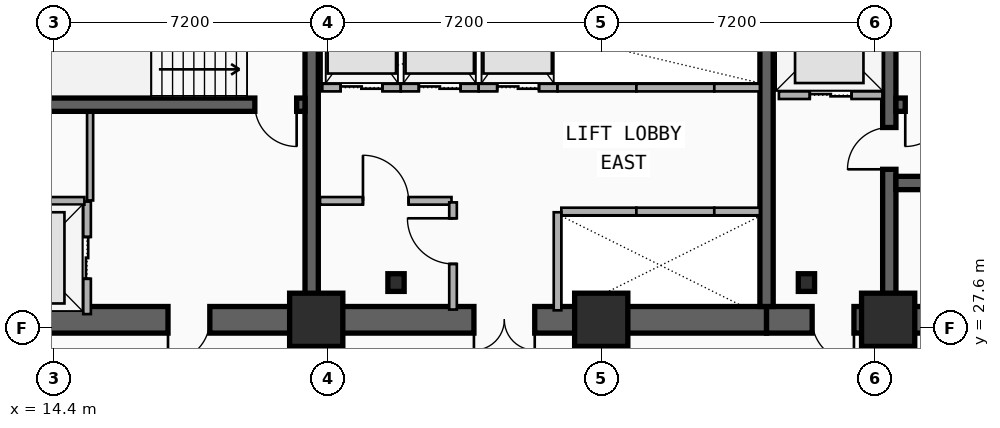
"""IFC4 building model, lengths in metres.
Left out: names, types, materials, properties, quantities, classifications, styles, units other than length and angle.
Written with IfcOpenShell. Run it as: python <this file> out.ifc"""

import sys

from ifc_helpers import new_model, si_unit, direction, frame, frame_2d, origin, origin_2d, place, context, subcontext, project, spatial, rectangle, i_section, extrude, element, fill, save


model = new_model("IFC4")
c1 = context("Model", 3, precision=1e-05, world=origin(), true_north=direction((0.0, 1.0)))
c2 = subcontext(c1, "Body", "Model", "MODEL_VIEW")
j1 = project(units=[si_unit("LENGTHUNIT", "METRE"), si_unit("PLANEANGLEUNIT", "RADIAN")], contexts=[c1])
p1 = place(None, origin())
s1 = spatial("IfcSite", under=j1, at=p1, CompositionType="ELEMENT")
p2 = place(p1, origin())
s2 = spatial("IfcBuilding", under=s1, at=p2, CompositionType="ELEMENT")
p3 = place(p2, frame((0.0, 0.0, 39.5)))
s3 = spatial("IfcBuildingStorey", under=s2, at=p3, CompositionType="ELEMENT", Elevation=39.5)
p4 = place(p3, frame((21.18, 27.82, 0.0), z_axis=(0.0, 0.0, 1.0), x_axis=(-1.0, 0.0, 0.0)))
e1 = element("IfcWall", 1, at=p4, inside=s3, PredefinedType="SHEAR", context=c2, shape_type="SweptSolid", body=[
    extrude(rectangle(XDim=9.03, YDim=0.7, at=frame_2d((4.515, 0.0))), origin(), (0.0, 0.0, 1.0), 3.5),
])
p5 = place(p4, frame((2.68, 0.0, 0.0)))
e2 = element("IfcOpeningElement", 2, at=p5, cuts=e1, PredefinedType="OPENING", context=c2, shape_type="SweptSolid", body=[
    extrude(rectangle(XDim=1.1, YDim=2.15, at=frame_2d((0.55, 1.075))), frame((0.0, 0.36, 0.0), z_axis=(0.0, -1.0, 0.0), x_axis=(1.0, 0.0, 0.0)), (0.0, 0.0, 1.0), 0.72),
])
p6 = place(p3, frame((33.15, 27.82, 0.0), z_axis=(0.0, 0.0, 1.0), x_axis=(-1.0, 0.0, 0.0)))
e3 = element("IfcWall", 3, at=p6, inside=s3, PredefinedType="SHEAR", context=c2, shape_type="SweptSolid", body=[
    extrude(rectangle(XDim=11.97, YDim=0.7, at=frame_2d((5.985, 0.0))), origin(), (0.0, 0.0, 1.0), 3.5),
])
p7 = place(p6, frame((6.1, 0.0, 0.0)))
e4 = element("IfcOpeningElement", 4, at=p7, cuts=e3, PredefinedType="OPENING", context=c2, shape_type="SweptSolid", body=[
    extrude(rectangle(XDim=1.6, YDim=2.2, at=frame_2d((0.8, 1.1))), frame((0.0, 0.36, 0.0), z_axis=(0.0, -1.0, 0.0), x_axis=(1.0, 0.0, 0.0)), (0.0, 0.0, 1.0), 0.72),
])
p8 = place(p3, frame((45.38, 27.82, 0.0), z_axis=(0.0, 0.0, 1.0), x_axis=(-1.0, 0.0, 0.0)))
e5 = element("IfcWall", 5, at=p8, inside=s3, PredefinedType="SHEAR", context=c2, shape_type="SweptSolid", body=[
    extrude(rectangle(XDim=12.23, YDim=0.7, at=frame_2d((6.115, 0.0))), origin(), (0.0, 0.0, 1.0), 3.5),
])
p9 = place(p8, frame((9.93, 0.0, 0.0)))
e6 = element("IfcOpeningElement", 6, at=p9, cuts=e5, PredefinedType="OPENING", context=c2, shape_type="SweptSolid", body=[
    extrude(rectangle(XDim=1.1, YDim=2.15, at=frame_2d((0.55, 1.075))), frame((0.0, 0.36, 0.0), z_axis=(0.0, -1.0, 0.0), x_axis=(1.0, 0.0, 0.0)), (0.0, 0.0, 1.0), 0.72),
])
p10 = place(p8, frame((6.23, 0.0, 0.0)))
e7 = element("IfcOpeningElement", 7, at=p10, cuts=e5, PredefinedType="OPENING", context=c2, shape_type="SweptSolid", body=[
    extrude(rectangle(XDim=1.1, YDim=2.15, at=frame_2d((0.55, 1.075))), frame((0.0, 0.36, 0.0), z_axis=(0.0, -1.0, 0.0), x_axis=(1.0, 0.0, 0.0)), (0.0, 0.0, 1.0), 0.72),
])
for number, where, z_axis, x_axis in (
    (8, (21.18, 28.17, 0.0), (0.0, 0.0, 1.0), (0.0, 1.0, 0.0)),
    (9, (33.15, 28.17, 0.0), (0.0, 0.0, 1.0), (0.0, 1.0, 0.0)),
):
    element("IfcWall", number, at=place(p3, frame(where, z_axis=z_axis, x_axis=x_axis)), inside=s3, PredefinedType="SHEAR", context=c2, shape_type="SweptSolid", body=[
        extrude(rectangle(XDim=8.53, YDim=0.35, at=frame_2d((4.265, 0.0))), origin(), (0.0, 0.0, 1.0), 3.5),
    ])
p11 = place(p3, frame((36.38, 28.17, 0.0), z_axis=(0.0, 0.0, 1.0), x_axis=(0.0, 1.0, 0.0)))
e10 = element("IfcWall", 10, at=p11, inside=s3, PredefinedType="SHEAR", context=c2, shape_type="SweptSolid", body=[
    extrude(rectangle(XDim=8.53, YDim=0.35, at=frame_2d((4.265, 0.0))), origin(), (0.0, 0.0, 1.0), 3.5),
])
p12 = place(p11, frame((3.61, 0.0, 0.0)))
e11 = element("IfcOpeningElement", 11, at=p12, cuts=e10, PredefinedType="OPENING", context=c2, shape_type="SweptSolid", body=[
    extrude(rectangle(XDim=1.1, YDim=2.15, at=frame_2d((0.55, 1.075))), frame((0.0, 0.185, 0.0), z_axis=(0.0, -1.0, 0.0), x_axis=(1.0, 0.0, 0.0)), (0.0, 0.0, 1.0), 0.37),
])
p13 = place(p3, frame((21.005, 33.48, 0.0), z_axis=(0.0, 0.0, 1.0), x_axis=(-1.0, 0.0, 0.0)))
e12 = element("IfcWall", 12, at=p13, inside=s3, PredefinedType="SHEAR", context=c2, shape_type="SweptSolid", body=[
    extrude(rectangle(XDim=8.505, YDim=0.35, at=frame_2d((4.252, 0.0))), origin(), (0.0, 0.0, 1.0), 3.5),
])
p14 = place(p13, frame((0.22, 0.0, 0.0)))
e13 = element("IfcOpeningElement", 13, at=p14, cuts=e12, PredefinedType="OPENING", context=c2, shape_type="SweptSolid", body=[
    extrude(rectangle(XDim=1.1, YDim=2.15, at=frame_2d((0.55, 1.075))), frame((0.0, 0.185, 0.0), z_axis=(0.0, -1.0, 0.0), x_axis=(1.0, 0.0, 0.0)), (0.0, 0.0, 1.0), 0.37),
])
p15 = place(p3, frame((45.03, 33.48, 0.0), z_axis=(0.0, 0.0, 1.0), x_axis=(-1.0, 0.0, 0.0)))
e14 = element("IfcWall", 14, at=p15, inside=s3, PredefinedType="SHEAR", context=c2, shape_type="SweptSolid", body=[
    extrude(rectangle(XDim=8.475, YDim=0.35, at=frame_2d((4.238, 0.0))), origin(), (0.0, 0.0, 1.0), 3.5),
])
p16 = place(p15, frame((7.13, 0.0, 0.0)))
e15 = element("IfcOpeningElement", 15, at=p16, cuts=e14, PredefinedType="OPENING", context=c2, shape_type="SweptSolid", body=[
    extrude(rectangle(XDim=1.1, YDim=2.15, at=frame_2d((0.55, 1.075))), frame((0.0, 0.185, 0.0), z_axis=(0.0, -1.0, 0.0), x_axis=(1.0, 0.0, 0.0)), (0.0, 0.0, 1.0), 0.37),
])
p17 = place(p3, frame((36.555, 31.42, 0.0), z_axis=(0.0, 0.0, 1.0), x_axis=(1.0, 0.0, 0.0)))
e16 = element("IfcWall", 16, at=p17, inside=s3, PredefinedType="SHEAR", context=c2, shape_type="SweptSolid", body=[
    extrude(rectangle(XDim=8.475, YDim=0.35, at=frame_2d((4.238, 0.0))), origin(), (0.0, 0.0, 1.0), 3.5),
])
for number, where, z_axis, x_axis in (
    (17, (23.4, 28.8, 0.0), (0.0, 0.0, 1.0), (1.0, 0.0, 0.0)),
    (18, (34.2, 28.8, 0.0), (0.0, 0.0, 1.0), (1.0, 0.0, 0.0)),
):
    element("IfcColumn", number, at=place(p3, frame(where, z_axis=z_axis, x_axis=x_axis)), inside=s3, PredefinedType="COLUMN", context=c2, shape_type="SweptSolid", body=[
        extrude(i_section(OverallWidth=0.428, OverallDepth=0.465, WebThickness=0.045, FlangeThickness=0.073, FilletRadius=0.015, at=origin_2d()), origin(), (0.0, 0.0, 1.0), 3.5),
    ])
for number, where, z_axis, x_axis in (
    (19, (21.3, 27.82, 0.0), (0.0, 0.0, 1.0), (1.0, 0.0, 0.0)),
    (20, (28.8, 27.82, 0.0), (0.0, 0.0, 1.0), (1.0, 0.0, 0.0)),
    (21, (36.35, 27.82, 0.0), (0.0, 0.0, 1.0), (1.0, 0.0, 0.0)),
):
    element("IfcColumn", number, at=place(p3, frame(where, z_axis=z_axis, x_axis=x_axis)), inside=s3, PredefinedType="COLUMN", context=c2, shape_type="SweptSolid", body=[
        extrude(rectangle(XDim=1.4, YDim=1.4, at=origin_2d()), origin(), (0.0, 0.0, 1.0), 3.5),
    ])
p18 = place(p3, frame((15.27, 27.97, 0.0), z_axis=(0.0, 0.0, 1.0), x_axis=(0.0, 1.0, 0.0)))
e22 = element("IfcWall", 22, at=p18, inside=s3, PredefinedType="PARTITIONING", context=c2, shape_type="SweptSolid", body=[
    extrude(rectangle(XDim=2.96, YDim=0.2, at=frame_2d((1.48, 0.0))), origin(), (0.0, 0.0, 1.0), 2.212),
])
p19 = place(p18, frame((0.93, 0.0, 0.0)))
e23 = element("IfcOpeningElement", 23, at=p19, cuts=e22, PredefinedType="OPENING", context=c2, shape_type="SweptSolid", body=[
    extrude(rectangle(XDim=1.1, YDim=2.15, at=frame_2d((0.55, 1.075))), frame((0.0, 0.11, 0.0), z_axis=(0.0, -1.0, 0.0), x_axis=(1.0, 0.0, 0.0)), (0.0, 0.0, 1.0), 0.22),
])
p20 = place(p3, frame((12.45, 30.95, 0.0), z_axis=(0.0, 0.0, 1.0), x_axis=(1.0, 0.0, 0.0)))
e24 = element("IfcWall", 24, at=p20, inside=s3, PredefinedType="PARTITIONING", context=c2, shape_type="SweptSolid", body=[
    extrude(rectangle(XDim=2.75, YDim=0.2, at=frame_2d((1.375, 0.0))), origin(), (0.0, 0.0, 1.0), 2.212),
])
p21 = place(p3, frame((33.475, 33.73, 0.0), z_axis=(0.0, 0.0, 1.0), x_axis=(1.0, 0.0, 0.0)))
e25 = element("IfcWall", 25, at=p21, inside=s3, PredefinedType="PARTITIONING", context=c2, shape_type="SweptSolid", body=[
    extrude(rectangle(XDim=2.725, YDim=0.2, at=frame_2d((1.362, 0.0))), origin(), (0.0, 0.0, 1.0), 2.212),
])
p22 = place(p21, frame((0.812, 0.0, 0.0)))
e26 = element("IfcOpeningElement", 26, at=p22, cuts=e25, PredefinedType="OPENING", context=c2, shape_type="SweptSolid", body=[
    extrude(rectangle(XDim=1.1, YDim=2.15, at=frame_2d((0.55, 1.075))), frame((0.0, 0.11, 0.0), z_axis=(0.0, -1.0, 0.0), x_axis=(1.0, 0.0, 0.0)), (0.0, 0.0, 1.0), 0.22),
])
p23 = place(p3, frame((27.75, 30.67, 0.0), z_axis=(0.0, 0.0, 1.0), x_axis=(1.0, 0.0, 0.0)))
e27 = element("IfcWall", 27, at=p23, inside=s3, PredefinedType="PARTITIONING", context=c2, shape_type="SweptSolid", body=[
    extrude(rectangle(XDim=1.975, YDim=0.2, at=frame_2d((0.988, 0.0))), origin(), (0.0, 0.0, 1.0), 2.212),
])
p24 = place(p3, frame((27.65, 28.07, 0.0), z_axis=(0.0, 0.0, 1.0), x_axis=(0.0, 1.0, 0.0)))
e28 = element("IfcWall", 28, at=p24, inside=s3, PredefinedType="PARTITIONING", context=c2, shape_type="SweptSolid", body=[
    extrude(rectangle(XDim=2.58, YDim=0.2, at=frame_2d((1.29, 0.0))), origin(), (0.0, 0.0, 1.0), 2.212),
])
p25 = place(p3, frame((29.725, 30.67, 0.0), z_axis=(0.0, 0.0, 1.0), x_axis=(1.0, 0.0, 0.0)))
e29 = element("IfcWall", 29, at=p25, inside=s3, PredefinedType="PARTITIONING", context=c2, shape_type="SweptSolid", body=[
    extrude(rectangle(XDim=2.05, YDim=0.2, at=frame_2d((1.025, 0.0))), origin(), (0.0, 0.0, 1.0), 2.62),
])
p26 = place(p3, frame((31.775, 30.67, 0.0), z_axis=(0.0, 0.0, 1.0), x_axis=(1.0, 0.0, 0.0)))
e30 = element("IfcWall", 30, at=p26, inside=s3, PredefinedType="PARTITIONING", context=c2, shape_type="SweptSolid", body=[
    extrude(rectangle(XDim=1.2, YDim=0.2, at=frame_2d((0.6, 0.0))), origin(), (0.0, 0.0, 1.0), 2.62),
])
p27 = place(p3, frame((21.46, 33.93, 0.0), z_axis=(0.0, 0.0, 1.0), x_axis=(1.0, 0.0, 0.0)))
e31 = element("IfcWall", 31, at=p27, inside=s3, PredefinedType="PARTITIONING", context=c2, shape_type="SweptSolid", body=[
    extrude(rectangle(XDim=2.065, YDim=0.2, at=frame_2d((1.032, 0.0))), origin(), (0.0, 0.0, 1.0), 2.212),
])
p28 = place(p27, frame((0.482, 0.0, 0.0)))
e32 = element("IfcOpeningElement", 32, at=p28, cuts=e31, PredefinedType="OPENING", context=c2, shape_type="SweptSolid", body=[
    extrude(rectangle(XDim=1.1, YDim=2.15, at=frame_2d((0.55, 1.075))), frame((0.0, 0.11, 0.0), z_axis=(0.0, -1.0, 0.0), x_axis=(1.0, 0.0, 0.0)), (0.0, 0.0, 1.0), 0.22),
])
p29 = place(p3, frame((23.525, 33.93, 0.0), z_axis=(0.0, 0.0, 1.0), x_axis=(1.0, 0.0, 0.0)))
e33 = element("IfcWall", 33, at=p29, inside=s3, PredefinedType="PARTITIONING", context=c2, shape_type="SweptSolid", body=[
    extrude(rectangle(XDim=2.05, YDim=0.2, at=frame_2d((1.025, 0.0))), origin(), (0.0, 0.0, 1.0), 3.24),
])
p30 = place(p29, frame((0.475, 0.0, 0.0)))
e34 = element("IfcOpeningElement", 34, at=p30, cuts=e33, PredefinedType="OPENING", context=c2, shape_type="SweptSolid", body=[
    extrude(rectangle(XDim=1.1, YDim=2.15, at=frame_2d((0.55, 1.075))), frame((0.0, 0.11, 0.0), z_axis=(0.0, -1.0, 0.0), x_axis=(1.0, 0.0, 0.0)), (0.0, 0.0, 1.0), 0.22),
])
p31 = place(p3, frame((25.575, 33.93, 0.0), z_axis=(0.0, 0.0, 1.0), x_axis=(1.0, 0.0, 0.0)))
e35 = element("IfcWall", 35, at=p31, inside=s3, PredefinedType="PARTITIONING", context=c2, shape_type="SweptSolid", body=[
    extrude(rectangle(XDim=2.075, YDim=0.2, at=frame_2d((1.038, 0.0))), origin(), (0.0, 0.0, 1.0), 3.24),
])
p32 = place(p31, frame((0.488, 0.0, 0.0)))
e36 = element("IfcOpeningElement", 36, at=p32, cuts=e35, PredefinedType="OPENING", context=c2, shape_type="SweptSolid", body=[
    extrude(rectangle(XDim=1.1, YDim=2.15, at=frame_2d((0.55, 1.075))), frame((0.0, 0.11, 0.0), z_axis=(0.0, -1.0, 0.0), x_axis=(1.0, 0.0, 0.0)), (0.0, 0.0, 1.0), 0.22),
])
p33 = place(p3, frame((27.65, 33.93, 0.0), z_axis=(0.0, 0.0, 1.0), x_axis=(1.0, 0.0, 0.0)))
e37 = element("IfcWall", 37, at=p33, inside=s3, PredefinedType="PARTITIONING", context=c2, shape_type="SweptSolid", body=[
    extrude(rectangle(XDim=2.075, YDim=0.2, at=frame_2d((1.038, 0.0))), origin(), (0.0, 0.0, 1.0), 2.212),
])
p34 = place(p3, frame((29.725, 33.93, 0.0), z_axis=(0.0, 0.0, 1.0), x_axis=(1.0, 0.0, 0.0)))
e38 = element("IfcWall", 38, at=p34, inside=s3, PredefinedType="PARTITIONING", context=c2, shape_type="SweptSolid", body=[
    extrude(rectangle(XDim=2.05, YDim=0.2, at=frame_2d((1.025, 0.0))), origin(), (0.0, 0.0, 1.0), 3.24),
])
p35 = place(p3, frame((31.775, 33.93, 0.0), z_axis=(0.0, 0.0, 1.0), x_axis=(1.0, 0.0, 0.0)))
e39 = element("IfcWall", 39, at=p35, inside=s3, PredefinedType="PARTITIONING", context=c2, shape_type="SweptSolid", body=[
    extrude(rectangle(XDim=1.2, YDim=0.2, at=frame_2d((0.6, 0.0))), origin(), (0.0, 0.0, 1.0), 3.24),
])
p36 = place(p3, frame((21.4, 30.95, 0.0), z_axis=(0.0, 0.0, 1.0), x_axis=(1.0, 0.0, 0.0)))
e40 = element("IfcWall", 40, at=p36, inside=s3, PredefinedType="PARTITIONING", context=c2, shape_type="SweptSolid", body=[
    extrude(rectangle(XDim=3.46, YDim=0.2, at=frame_2d((1.73, 0.0))), origin(), (0.0, 0.0, 1.0), 2.28),
])
p37 = place(p36, frame((1.13, 0.0, 0.0)))
e41 = element("IfcOpeningElement", 41, at=p37, cuts=e40, PredefinedType="OPENING", context=c2, shape_type="SweptSolid", body=[
    extrude(rectangle(XDim=1.2, YDim=2.15, at=frame_2d((0.6, 1.075))), frame((0.0, 0.11, 0.0), z_axis=(0.0, -1.0, 0.0), x_axis=(1.0, 0.0, 0.0)), (0.0, 0.0, 1.0), 0.22),
])
p38 = place(p3, frame((24.9, 28.09, 0.0), z_axis=(0.0, 0.0, 1.0), x_axis=(0.0, 1.0, 0.0)))
e42 = element("IfcWall", 42, at=p38, inside=s3, PredefinedType="PARTITIONING", context=c2, shape_type="SweptSolid", body=[
    extrude(rectangle(XDim=2.82, YDim=0.2, at=frame_2d((1.41, 0.0))), origin(), (0.0, 0.0, 1.0), 2.62),
])
p39 = place(p38, frame((1.201, 0.0, 0.0)))
e43 = element("IfcOpeningElement", 43, at=p39, cuts=e42, PredefinedType="OPENING", context=c2, shape_type="SweptSolid", body=[
    extrude(rectangle(XDim=1.2, YDim=2.15, at=frame_2d((0.6, 1.075))), frame((0.0, 0.11, 0.0), z_axis=(0.0, -1.0, 0.0), x_axis=(1.0, 0.0, 0.0)), (0.0, 0.0, 1.0), 0.22),
])
p40 = place(p3, frame((15.35, 30.96, 0.0), z_axis=(0.0, 0.0, 1.0), x_axis=(0.0, 1.0, 0.0)))
e44 = element("IfcWall", 44, at=p40, inside=s3, PredefinedType="PARTITIONING", context=c2, shape_type="SweptSolid", body=[
    extrude(rectangle(XDim=2.31, YDim=0.16, at=frame_2d((1.155, 0.0))), origin(), (0.0, 0.0, 1.0), 3.24),
])
p41 = place(p19, origin())
e45 = element("IfcDoor", 45, at=p41, inside=s3, OperationType="DOUBLE_DOOR_SLIDING", PredefinedType="DOOR", context=c2, shape_type="SweptSolid", body=[
    extrude(rectangle(XDim=1.1, YDim=2.15, at=frame_2d((0.55, 1.075))), frame((0.0, 0.025, 0.0), z_axis=(0.0, -1.0, 0.0), x_axis=(1.0, 0.0, 0.0)), (0.0, 0.0, 1.0), 0.05),
])
fill(e23, e45)
p42 = place(p22, origin())
e46 = element("IfcDoor", 46, at=p42, inside=s3, OperationType="DOUBLE_DOOR_SLIDING", PredefinedType="DOOR", context=c2, shape_type="SweptSolid", body=[
    extrude(rectangle(XDim=1.1, YDim=2.15, at=frame_2d((0.55, 1.075))), frame((0.0, 0.025, 0.0), z_axis=(0.0, -1.0, 0.0), x_axis=(1.0, 0.0, 0.0)), (0.0, 0.0, 1.0), 0.05),
])
fill(e26, e46)
p43 = place(p28, origin())
e47 = element("IfcDoor", 47, at=p43, inside=s3, OperationType="DOUBLE_DOOR_SLIDING", PredefinedType="DOOR", context=c2, shape_type="SweptSolid", body=[
    extrude(rectangle(XDim=1.1, YDim=2.15, at=frame_2d((0.55, 1.075))), frame((0.0, 0.025, 0.0), z_axis=(0.0, -1.0, 0.0), x_axis=(1.0, 0.0, 0.0)), (0.0, 0.0, 1.0), 0.05),
])
fill(e32, e47)
p44 = place(p30, origin())
e48 = element("IfcDoor", 48, at=p44, inside=s3, OperationType="DOUBLE_DOOR_SLIDING", PredefinedType="DOOR", context=c2, shape_type="SweptSolid", body=[
    extrude(rectangle(XDim=1.1, YDim=2.15, at=frame_2d((0.55, 1.075))), frame((0.0, 0.025, 0.0), z_axis=(0.0, -1.0, 0.0), x_axis=(1.0, 0.0, 0.0)), (0.0, 0.0, 1.0), 0.05),
])
fill(e34, e48)
p45 = place(p32, origin())
e49 = element("IfcDoor", 49, at=p45, inside=s3, OperationType="DOUBLE_DOOR_SLIDING", PredefinedType="DOOR", context=c2, shape_type="SweptSolid", body=[
    extrude(rectangle(XDim=1.1, YDim=2.15, at=frame_2d((0.55, 1.075))), frame((0.0, 0.025, 0.0), z_axis=(0.0, -1.0, 0.0), x_axis=(1.0, 0.0, 0.0)), (0.0, 0.0, 1.0), 0.05),
])
fill(e36, e49)
p46 = place(p14, origin())
e50 = element("IfcDoor", 50, at=p46, inside=s3, OperationType="SINGLE_SWING_LEFT", PredefinedType="DOOR", context=c2, shape_type="SweptSolid", body=[
    extrude(rectangle(XDim=1.1, YDim=2.15, at=frame_2d((0.55, 1.075))), frame((0.0, 0.025, 0.0), z_axis=(0.0, -1.0, 0.0), x_axis=(1.0, 0.0, 0.0)), (0.0, 0.0, 1.0), 0.05),
])
fill(e13, e50)
p47 = place(p5, origin())
e51 = element("IfcDoor", 51, at=p47, inside=s3, OperationType="SINGLE_SWING_RIGHT", PredefinedType="DOOR", context=c2, shape_type="SweptSolid", body=[
    extrude(rectangle(XDim=1.1, YDim=2.15, at=frame_2d((0.55, 1.075))), frame((0.0, 0.025, 0.0), z_axis=(0.0, -1.0, 0.0), x_axis=(1.0, 0.0, 0.0)), (0.0, 0.0, 1.0), 0.05),
])
fill(e2, e51)
p48 = place(p16, origin())
e52 = element("IfcDoor", 52, at=p48, inside=s3, OperationType="SINGLE_SWING_RIGHT", PredefinedType="DOOR", context=c2, shape_type="SweptSolid", body=[
    extrude(rectangle(XDim=1.1, YDim=2.15, at=frame_2d((0.55, 1.075))), frame((0.0, 0.025, 0.0), z_axis=(0.0, -1.0, 0.0), x_axis=(1.0, 0.0, 0.0)), (0.0, 0.0, 1.0), 0.05),
])
fill(e15, e52)
p49 = place(p12, origin())
e53 = element("IfcDoor", 53, at=p49, inside=s3, OperationType="SINGLE_SWING_LEFT", PredefinedType="DOOR", context=c2, shape_type="SweptSolid", body=[
    extrude(rectangle(XDim=1.1, YDim=2.15, at=frame_2d((0.55, 1.075))), frame((0.0, 0.025, 0.0), z_axis=(0.0, -1.0, 0.0), x_axis=(1.0, 0.0, 0.0)), (0.0, 0.0, 1.0), 0.05),
])
fill(e11, e53)
p50 = place(p9, origin())
e54 = element("IfcDoor", 54, at=p50, inside=s3, OperationType="SINGLE_SWING_LEFT", PredefinedType="DOOR", context=c2, shape_type="SweptSolid", body=[
    extrude(rectangle(XDim=1.1, YDim=2.15, at=frame_2d((0.55, 1.075))), frame((0.0, 0.025, 0.0), z_axis=(0.0, -1.0, 0.0), x_axis=(1.0, 0.0, 0.0)), (0.0, 0.0, 1.0), 0.05),
])
fill(e6, e54)
p51 = place(p7, origin())
e55 = element("IfcDoor", 55, at=p51, inside=s3, OperationType="SINGLE_SWING_LEFT", PredefinedType="DOOR", context=c2, shape_type="SweptSolid", body=[
    extrude(rectangle(XDim=1.6, YDim=2.2, at=frame_2d((0.8, 1.1))), frame((0.0, 0.025, 0.0), z_axis=(0.0, -1.0, 0.0), x_axis=(1.0, 0.0, 0.0)), (0.0, 0.0, 1.0), 0.05),
])
fill(e4, e55)
p52 = place(p37, origin())
e56 = element("IfcDoor", 56, at=p52, inside=s3, OperationType="SINGLE_SWING_LEFT", PredefinedType="DOOR", context=c2, shape_type="SweptSolid", body=[
    extrude(rectangle(XDim=1.2, YDim=2.15, at=frame_2d((0.6, 1.075))), frame((0.0, 0.025, 0.0), z_axis=(0.0, -1.0, 0.0), x_axis=(1.0, 0.0, 0.0)), (0.0, 0.0, 1.0), 0.05),
])
fill(e41, e56)
p53 = place(p39, origin())
e57 = element("IfcDoor", 57, at=p53, inside=s3, OperationType="SINGLE_SWING_RIGHT", PredefinedType="DOOR", context=c2, shape_type="SweptSolid", body=[
    extrude(rectangle(XDim=1.2, YDim=2.15, at=frame_2d((0.6, 1.075))), frame((0.0, 0.025, 0.0), z_axis=(0.0, -1.0, 0.0), x_axis=(1.0, 0.0, 0.0)), (0.0, 0.0, 1.0), 0.05),
])
fill(e43, e57)
save(model, sys.argv[1])
